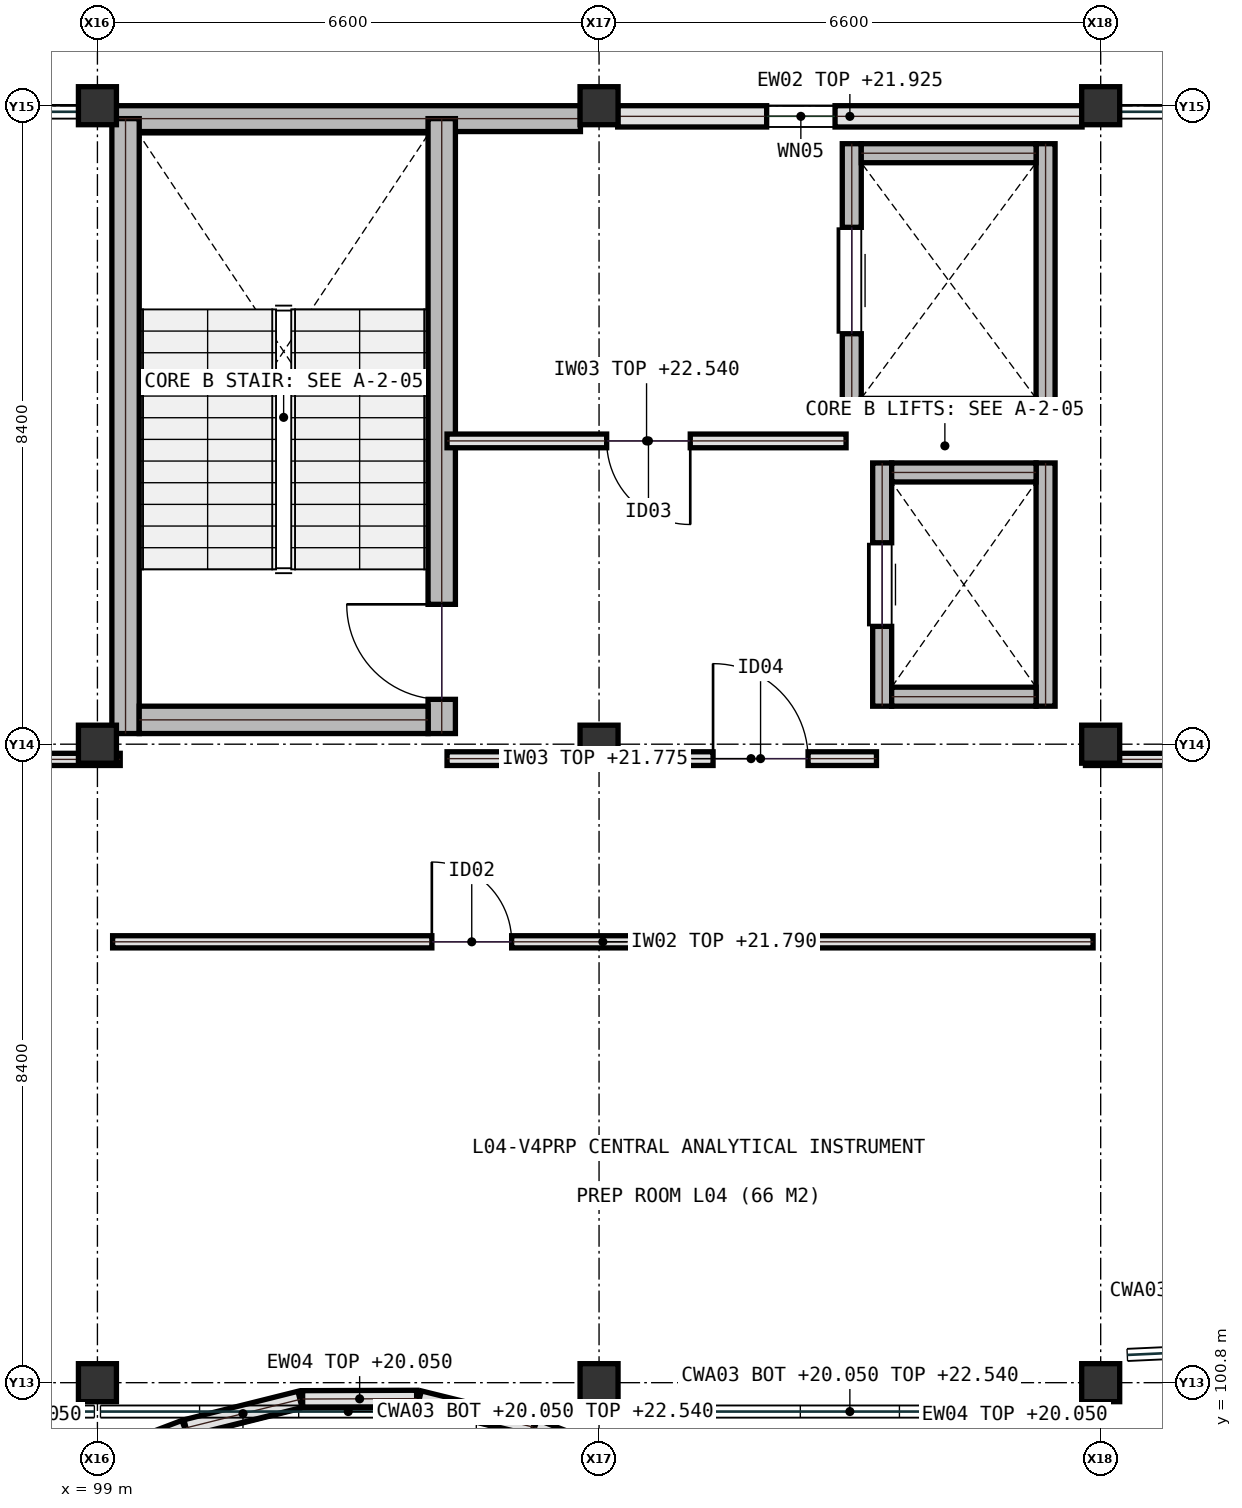
"""IFC4 building model, lengths in metres.
Left out: names, types, materials, properties, quantities, classifications, styles, units other than length and angle.
Written with IfcOpenShell. Run it as: python <this file> out.ifc"""

import sys

from ifc_helpers import new_model, si_unit, direction, frame, frame_2d, origin, origin_2d, place, context, subcontext, project, spatial, rectangle, extrude, element, fill, save


model = new_model("IFC4")
c1 = context("Model", 3, precision=1e-05, world=origin(), true_north=direction((0.0, 1.0)))
c2 = subcontext(c1, "Body", "Model", "MODEL_VIEW")
j1 = project(units=[si_unit("LENGTHUNIT", "METRE"), si_unit("PLANEANGLEUNIT", "RADIAN")], contexts=[c1])
p1 = place(None, origin())
s1 = spatial("IfcSite", under=j1, at=p1, CompositionType="ELEMENT")
p2 = place(p1, origin())
s2 = spatial("IfcBuilding", under=s1, at=p2, CompositionType="ELEMENT")
p3 = place(p2, frame((0.0, 0.0, 18.6)))
s3 = spatial("IfcBuildingStorey", under=s2, at=p3, CompositionType="ELEMENT", Elevation=18.6)
for number, where, z_axis, x_axis in (
    (1, (99.0, 100.8, 0.0), (0.0, 0.0, 1.0), (1.0, 0.0, 0.0)),
    (2, (99.0, 109.2, 0.0), (0.0, 0.0, 1.0), (1.0, 0.0, 0.0)),
    (3, (99.0, 117.6, 0.0), (0.0, 0.0, 1.0), (1.0, 0.0, 0.0)),
    (4, (105.6, 100.8, 0.0), (0.0, 0.0, 1.0), (1.0, 0.0, 0.0)),
    (5, (105.6, 109.2, 0.0), (0.0, 0.0, 1.0), (1.0, 0.0, 0.0)),
    (6, (105.6, 117.6, 0.0), (0.0, 0.0, 1.0), (1.0, 0.0, 0.0)),
    (7, (112.2, 100.8, 0.0), (0.0, 0.0, 1.0), (1.0, 0.0, 0.0)),
    (8, (112.2, 109.2, 0.0), (0.0, 0.0, 1.0), (1.0, 0.0, 0.0)),
    (9, (112.2, 117.6, 0.0), (0.0, 0.0, 1.0), (1.0, 0.0, 0.0)),
):
    element("IfcColumn", number, at=place(p3, frame(where, z_axis=z_axis, x_axis=x_axis)), inside=s3, PredefinedType="COLUMN", context=c2, shape_type="SweptSolid", body=[
        extrude(rectangle(XDim=0.5, YDim=0.5, at=origin_2d()), origin(), (0.0, 0.0, 1.0), 4.2),
    ])
p4 = place(p3, frame((92.85, 109.0, 0.0), z_axis=(0.0, 0.0, 1.0), x_axis=(1.0, 0.0, 0.0)))
e10 = element("IfcWall", 10, at=p4, inside=s3, PredefinedType="PARTITIONING", context=c2, shape_type="SweptSolid", body=[
    extrude(rectangle(XDim=6.45, YDim=0.16, at=frame_2d((3.225, 0.0))), origin(), (0.0, 0.0, 1.0), 3.175),
])
p5 = place(p3, frame((112.0, 109.0, 0.0), z_axis=(0.0, 0.0, 1.0), x_axis=(1.0, 0.0, 0.0)))
e11 = element("IfcWall", 11, at=p5, inside=s3, PredefinedType="PARTITIONING", context=c2, shape_type="SweptSolid", body=[
    extrude(rectangle(XDim=6.35, YDim=0.16, at=frame_2d((3.175, 0.0))), origin(), (0.0, 0.0, 1.0), 3.175),
])
p6 = place(p5, frame((5.0, 0.0, 0.0)))
e12 = element("IfcOpeningElement", 12, at=p6, cuts=e11, PredefinedType="OPENING", context=c2, shape_type="SweptSolid", body=[
    extrude(rectangle(XDim=1.0, YDim=2.2, at=frame_2d((0.5, 1.1))), frame((0.0, 0.09, 0.0), z_axis=(0.0, -1.0, 0.0), x_axis=(1.0, 0.0, 0.0)), (0.0, 0.0, 1.0), 0.18),
])
p7 = place(p3, frame((99.2, 106.6, 0.0), z_axis=(0.0, 0.0, 1.0), x_axis=(1.0, 0.0, 0.0)))
e13 = element("IfcWall", 13, at=p7, inside=s3, PredefinedType="PARTITIONING", context=c2, shape_type="SweptSolid", body=[
    extrude(rectangle(XDim=12.9, YDim=0.16, at=frame_2d((6.45, 0.0))), origin(), (0.0, 0.0, 1.0), 3.19),
])
p8 = place(p7, frame((4.2, 0.0, 0.0)))
e14 = element("IfcOpeningElement", 14, at=p8, cuts=e13, PredefinedType="OPENING", context=c2, shape_type="SweptSolid", body=[
    extrude(rectangle(XDim=1.05, YDim=2.15, at=frame_2d((0.525, 1.075))), frame((0.0, 0.09, 0.0), z_axis=(0.0, -1.0, 0.0), x_axis=(1.0, 0.0, 0.0)), (0.0, 0.0, 1.0), 0.18),
])
p9 = place(p3, frame((105.355, 117.43, 0.0), z_axis=(0.0, 0.0, 1.0), x_axis=(-1.0, 0.0, 0.0)))
e15 = element("IfcWall", 15, at=p9, inside=s3, PredefinedType="SHEAR", context=c2, shape_type="SweptSolid", body=[
    extrude(rectangle(XDim=6.11, YDim=0.34, at=frame_2d((3.055, 0.0))), origin(), (0.0, 0.0, 1.0), 3.94),
])
p10 = place(p3, frame((111.955, 117.46, 0.0), z_axis=(0.0, 0.0, 1.0), x_axis=(-1.0, 0.0, 0.0)))
e16 = element("IfcWall", 16, at=p10, inside=s3, PredefinedType="SOLIDWALL", context=c2, shape_type="SweptSolid", body=[
    extrude(rectangle(XDim=6.11, YDim=0.28, at=frame_2d((3.055, 0.0))), origin(), (0.0, 0.0, 1.0), 3.325),
])
p11 = place(p10, frame((3.25, 0.0, 0.95)))
e17 = element("IfcOpeningElement", 17, at=p11, cuts=e16, PredefinedType="OPENING", context=c2, shape_type="SweptSolid", body=[
    extrude(rectangle(XDim=0.9, YDim=1.4, at=frame_2d((0.45, 0.7))), frame((0.0, 0.15, 0.0), z_axis=(0.0, -1.0, 0.0), x_axis=(1.0, 0.0, 0.0)), (0.0, 0.0, 1.0), 0.3),
])
p12 = place(p3, frame((98.65, 99.63, 0.0), z_axis=(0.0, 0.0, 1.0), x_axis=(0.934769434387, 0.355254985237, 0.0)))
e18 = element("IfcWall", 18, at=p12, inside=s3, PredefinedType="SOLIDWALL", context=c2, shape_type="SweptSolid", body=[
    extrude(rectangle(XDim=1.605, YDim=0.22, at=frame_2d((0.802, 0.0))), origin(), (0.0, 0.0, 1.0), 1.45),
])
p13 = place(p3, frame((100.165, 100.205, 0.0), z_axis=(0.0, 0.0, 1.0), x_axis=(0.970142500145, 0.242535625036, 0.0)))
e19 = element("IfcWall", 19, at=p13, inside=s3, PredefinedType="SOLIDWALL", context=c2, shape_type="SweptSolid", body=[
    extrude(rectangle(XDim=1.546, YDim=0.22, at=frame_2d((0.773, 0.0))), origin(), (0.0, 0.0, 1.0), 1.45),
])
p14 = place(p3, frame((101.7, 100.585, 0.0), z_axis=(0.0, 0.0, 1.0), x_axis=(0.999994158796, 0.003417948785, 0.0)))
e20 = element("IfcWall", 20, at=p14, inside=s3, PredefinedType="SOLIDWALL", context=c2, shape_type="SweptSolid", body=[
    extrude(rectangle(XDim=1.5, YDim=0.22, at=frame_2d((0.75, 0.0))), origin(), (0.0, 0.0, 1.0), 1.45),
])
p15 = place(p3, frame((103.235, 100.585, 0.0), z_axis=(0.0, 0.0, 1.0), x_axis=(0.970918311966, -0.239411009542, 0.0)))
e21 = element("IfcWall", 21, at=p15, inside=s3, PredefinedType="SOLIDWALL", context=c2, shape_type="SweptSolid", body=[
    extrude(rectangle(XDim=1.545, YDim=0.22, at=frame_2d((0.772, 0.0))), origin(), (0.0, 0.0, 1.0), 1.45),
])
p16 = place(p3, frame((104.75, 100.21, 0.0), z_axis=(0.0, 0.0, 1.0), x_axis=(0.933756275822, -0.35790951002, 0.0)))
e22 = element("IfcWall", 22, at=p16, inside=s3, PredefinedType="SOLIDWALL", context=c2, shape_type="SweptSolid", body=[
    extrude(rectangle(XDim=1.606, YDim=0.22, at=frame_2d((0.803, 0.0))), origin(), (0.0, 0.0, 1.0), 1.45),
])
p17 = place(p3, frame((112.15, 99.63, 0.0), z_axis=(0.0, 0.0, 1.0), x_axis=(0.930985139388, 0.365057078056, 0.0)))
e23 = element("IfcWall", 23, at=p17, inside=s3, PredefinedType="SOLIDWALL", context=c2, shape_type="SweptSolid", body=[
    extrude(rectangle(XDim=2.589, YDim=0.22, at=frame_2d((1.294, 0.0))), origin(), (0.0, 0.0, 1.0), 1.45),
])
p18 = place(p3, frame((99.37, 109.34, 0.0), z_axis=(0.0, 0.0, 1.0), x_axis=(0.0, 1.0, 0.0)))
e24 = element("IfcWall", 24, at=p18, inside=s3, PredefinedType="SHEAR", context=c2, shape_type="SweptSolid", body=[
    extrude(rectangle(XDim=8.09, YDim=0.36, at=frame_2d((4.045, 0.0))), origin(), (0.0, 0.0, 1.0), 3.94),
])
p19 = place(p3, frame((103.53, 109.34, 0.0), z_axis=(0.0, 0.0, 1.0), x_axis=(0.0, 1.0, 0.0)))
e25 = element("IfcWall", 25, at=p19, inside=s3, PredefinedType="SHEAR", context=c2, shape_type="SweptSolid", body=[
    extrude(rectangle(XDim=8.09, YDim=0.36, at=frame_2d((4.045, 0.0))), origin(), (0.0, 0.0, 1.0), 3.94),
])
p20 = place(p19, frame((0.45, 0.0, 0.0)))
e26 = element("IfcOpeningElement", 26, at=p20, cuts=e25, PredefinedType="OPENING", context=c2, shape_type="SweptSolid", body=[
    extrude(rectangle(XDim=1.25, YDim=2.15, at=frame_2d((0.625, 1.075))), frame((0.0, 0.19, 0.0), z_axis=(0.0, -1.0, 0.0), x_axis=(1.0, 0.0, 0.0)), (0.0, 0.0, 1.0), 0.38),
])
p21 = place(p3, frame((99.55, 109.52, 0.0), z_axis=(0.0, 0.0, 1.0), x_axis=(1.0, 0.0, 0.0)))
e27 = element("IfcWall", 27, at=p21, inside=s3, PredefinedType="SHEAR", context=c2, shape_type="SweptSolid", body=[
    extrude(rectangle(XDim=3.8, YDim=0.36, at=frame_2d((1.9, 0.0))), origin(), (0.0, 0.0, 1.0), 3.94),
])
p22 = place(p3, frame((109.325, 109.7, 0.0), z_axis=(0.0, 0.0, 1.0), x_axis=(0.0, 1.0, 0.0)))
e28 = element("IfcWall", 28, at=p22, inside=s3, PredefinedType="SHEAR", context=c2, shape_type="SweptSolid", body=[
    extrude(rectangle(XDim=3.2, YDim=0.25, at=frame_2d((1.6, 0.0))), origin(), (0.0, 0.0, 1.0), 3.94),
])
p23 = place(p22, frame((1.05, 0.0, 0.0)))
e29 = element("IfcOpeningElement", 29, at=p23, cuts=e28, PredefinedType="OPENING", context=c2, shape_type="SweptSolid", body=[
    extrude(rectangle(XDim=1.1, YDim=2.15, at=frame_2d((0.55, 1.075))), frame((0.0, 0.135, 0.0), z_axis=(0.0, -1.0, 0.0), x_axis=(1.0, 0.0, 0.0)), (0.0, 0.0, 1.0), 0.27),
])
p24 = place(p3, frame((111.475, 109.7, 0.0), z_axis=(0.0, 0.0, 1.0), x_axis=(0.0, 1.0, 0.0)))
e30 = element("IfcWall", 30, at=p24, inside=s3, PredefinedType="SHEAR", context=c2, shape_type="SweptSolid", body=[
    extrude(rectangle(XDim=3.2, YDim=0.25, at=frame_2d((1.6, 0.0))), origin(), (0.0, 0.0, 1.0), 3.94),
])
for number, where, z_axis, x_axis in (
    (31, (109.45, 109.825, 0.0), (0.0, 0.0, 1.0), (1.0, 0.0, 0.0)),
    (32, (109.45, 112.775, 0.0), (0.0, 0.0, 1.0), (1.0, 0.0, 0.0)),
):
    element("IfcWall", number, at=place(p3, frame(where, z_axis=z_axis, x_axis=x_axis)), inside=s3, PredefinedType="SHEAR", context=c2, shape_type="SweptSolid", body=[
        extrude(rectangle(XDim=1.9, YDim=0.25, at=frame_2d((0.95, 0.0))), origin(), (0.0, 0.0, 1.0), 3.94),
    ])
p25 = place(p3, frame((108.925, 113.5, 0.0), z_axis=(0.0, 0.0, 1.0), x_axis=(0.0, 1.0, 0.0)))
e33 = element("IfcWall", 33, at=p25, inside=s3, PredefinedType="SHEAR", context=c2, shape_type="SweptSolid", body=[
    extrude(rectangle(XDim=3.6, YDim=0.25, at=frame_2d((1.8, 0.0))), origin(), (0.0, 0.0, 1.0), 3.94),
])
p26 = place(p25, frame((1.1, 0.0, 0.0)))
e34 = element("IfcOpeningElement", 34, at=p26, cuts=e33, PredefinedType="OPENING", context=c2, shape_type="SweptSolid", body=[
    extrude(rectangle(XDim=1.4, YDim=2.2, at=frame_2d((0.7, 1.1))), frame((0.0, 0.135, 0.0), z_axis=(0.0, -1.0, 0.0), x_axis=(1.0, 0.0, 0.0)), (0.0, 0.0, 1.0), 0.27),
])
p27 = place(p3, frame((111.475, 113.5, 0.0), z_axis=(0.0, 0.0, 1.0), x_axis=(0.0, 1.0, 0.0)))
e35 = element("IfcWall", 35, at=p27, inside=s3, PredefinedType="SHEAR", context=c2, shape_type="SweptSolid", body=[
    extrude(rectangle(XDim=3.6, YDim=0.25, at=frame_2d((1.8, 0.0))), origin(), (0.0, 0.0, 1.0), 3.94),
])
for number, where, z_axis, x_axis in (
    (36, (109.05, 113.625, 0.0), (0.0, 0.0, 1.0), (1.0, 0.0, 0.0)),
    (37, (109.05, 116.975, 0.0), (0.0, 0.0, 1.0), (1.0, 0.0, 0.0)),
):
    element("IfcWall", number, at=place(p3, frame(where, z_axis=z_axis, x_axis=x_axis)), inside=s3, PredefinedType="SHEAR", context=c2, shape_type="SweptSolid", body=[
        extrude(rectangle(XDim=2.3, YDim=0.25, at=frame_2d((1.15, 0.0))), origin(), (0.0, 0.0, 1.0), 3.94),
    ])
p28 = place(p3, frame((103.6, 109.01, 0.0), z_axis=(0.0, 0.0, 1.0), x_axis=(1.0, 0.0, 0.0)))
e38 = element("IfcWall", 38, at=p28, inside=s3, PredefinedType="SOLIDWALL", context=c2, shape_type="SweptSolid", body=[
    extrude(rectangle(XDim=1.65, YDim=0.18, at=frame_2d((0.825, 0.0))), origin(), (0.0, 0.0, 1.0), 3.175),
])
p29 = place(p3, frame((105.95, 109.01, 0.0), z_axis=(0.0, 0.0, 1.0), x_axis=(1.0, 0.0, 0.0)))
e39 = element("IfcWall", 39, at=p29, inside=s3, PredefinedType="SOLIDWALL", context=c2, shape_type="SweptSolid", body=[
    extrude(rectangle(XDim=3.3, YDim=0.18, at=frame_2d((1.65, 0.0))), origin(), (0.0, 0.0, 1.0), 3.175),
])
p30 = place(p29, frame((1.15, 0.0, 0.0)))
e40 = element("IfcOpeningElement", 40, at=p30, cuts=e39, PredefinedType="OPENING", context=c2, shape_type="SweptSolid", body=[
    extrude(rectangle(XDim=1.25, YDim=2.15, at=frame_2d((0.625, 1.075))), frame((0.0, 0.1, 0.0), z_axis=(0.0, -1.0, 0.0), x_axis=(1.0, 0.0, 0.0)), (0.0, 0.0, 1.0), 0.2),
])
p31 = place(p3, frame((103.6, 113.19, 0.0), z_axis=(0.0, 0.0, 1.0), x_axis=(1.0, 0.0, 0.0)))
e41 = element("IfcWall", 41, at=p31, inside=s3, PredefinedType="SOLIDWALL", context=c2, shape_type="SweptSolid", body=[
    extrude(rectangle(XDim=5.25, YDim=0.18, at=frame_2d((2.625, 0.0))), origin(), (0.0, 0.0, 1.0), 3.94),
])
p32 = place(p31, frame((2.1, 0.0, 0.0)))
e42 = element("IfcOpeningElement", 42, at=p32, cuts=e41, PredefinedType="OPENING", context=c2, shape_type="SweptSolid", body=[
    extrude(rectangle(XDim=1.1, YDim=2.15, at=frame_2d((0.55, 1.075))), frame((0.0, 0.1, 0.0), z_axis=(0.0, -1.0, 0.0), x_axis=(1.0, 0.0, 0.0)), (0.0, 0.0, 1.0), 0.2),
])
p33 = place(p8, origin())
e43 = element("IfcDoor", 43, at=p33, inside=s3, OperationType="SINGLE_SWING_LEFT", PredefinedType="DOOR", context=c2, shape_type="SweptSolid", body=[
    extrude(rectangle(XDim=1.05, YDim=2.15, at=frame_2d((0.525, 1.075))), frame((0.0, 0.025, 0.0), z_axis=(0.0, -1.0, 0.0), x_axis=(1.0, 0.0, 0.0)), (0.0, 0.0, 1.0), 0.05),
])
fill(e14, e43)
p34 = place(p11, origin())
e44 = element("IfcWindow", 44, at=p34, inside=s3, PartitioningType="SINGLE_PANEL", PredefinedType="WINDOW", context=c2, shape_type="SweptSolid", body=[
    extrude(rectangle(XDim=0.9, YDim=1.4, at=frame_2d((0.45, 0.7))), frame((0.0, 0.03, 0.0), z_axis=(0.0, -1.0, 0.0), x_axis=(1.0, 0.0, 0.0)), (0.0, 0.0, 1.0), 0.06),
])
fill(e17, e44)
p35 = place(p20, origin())
e45 = element("IfcDoor", 45, at=p35, inside=s3, OperationType="SINGLE_SWING_RIGHT", PredefinedType="DOOR", context=c2, shape_type="SweptSolid", body=[
    extrude(rectangle(XDim=1.25, YDim=2.15, at=frame_2d((0.625, 1.075))), frame((0.0, 0.025, 0.0), z_axis=(0.0, -1.0, 0.0), x_axis=(1.0, 0.0, 0.0)), (0.0, 0.0, 1.0), 0.05),
])
fill(e26, e45)
p36 = place(p23, origin())
e46 = element("IfcDoor", 46, at=p36, inside=s3, OperationType="SLIDING_TO_LEFT", PredefinedType="DOOR", context=c2, shape_type="SweptSolid", body=[
    extrude(rectangle(XDim=1.1, YDim=2.15, at=frame_2d((0.55, 1.075))), frame((0.0, 0.025, 0.0), z_axis=(0.0, -1.0, 0.0), x_axis=(1.0, 0.0, 0.0)), (0.0, 0.0, 1.0), 0.05),
])
fill(e29, e46)
p37 = place(p26, origin())
e47 = element("IfcDoor", 47, at=p37, inside=s3, OperationType="SLIDING_TO_LEFT", PredefinedType="DOOR", context=c2, shape_type="SweptSolid", body=[
    extrude(rectangle(XDim=1.4, YDim=2.2, at=frame_2d((0.7, 1.1))), frame((0.0, 0.025, 0.0), z_axis=(0.0, -1.0, 0.0), x_axis=(1.0, 0.0, 0.0)), (0.0, 0.0, 1.0), 0.05),
])
fill(e34, e47)
p38 = place(p30, origin())
e48 = element("IfcDoor", 48, at=p38, inside=s3, OperationType="SINGLE_SWING_LEFT", PredefinedType="DOOR", context=c2, shape_type="SweptSolid", body=[
    extrude(rectangle(XDim=1.25, YDim=2.15, at=frame_2d((0.625, 1.075))), frame((0.0, 0.025, 0.0), z_axis=(0.0, -1.0, 0.0), x_axis=(1.0, 0.0, 0.0)), (0.0, 0.0, 1.0), 0.05),
])
fill(e40, e48)
p39 = place(p32, frame((1.1, 0.0, 0.0), z_axis=(0.0, 0.0, 1.0), x_axis=(-1.0, 0.0, 0.0)))
e49 = element("IfcDoor", 49, at=p39, inside=s3, OperationType="SINGLE_SWING_RIGHT", PredefinedType="DOOR", context=c2, shape_type="SweptSolid", body=[
    extrude(rectangle(XDim=1.1, YDim=2.15, at=frame_2d((0.55, 1.075))), frame((0.0, 0.025, 0.0), z_axis=(0.0, -1.0, 0.0), x_axis=(1.0, 0.0, 0.0)), (0.0, 0.0, 1.0), 0.05),
])
fill(e42, e49)
save(model, sys.argv[1])
